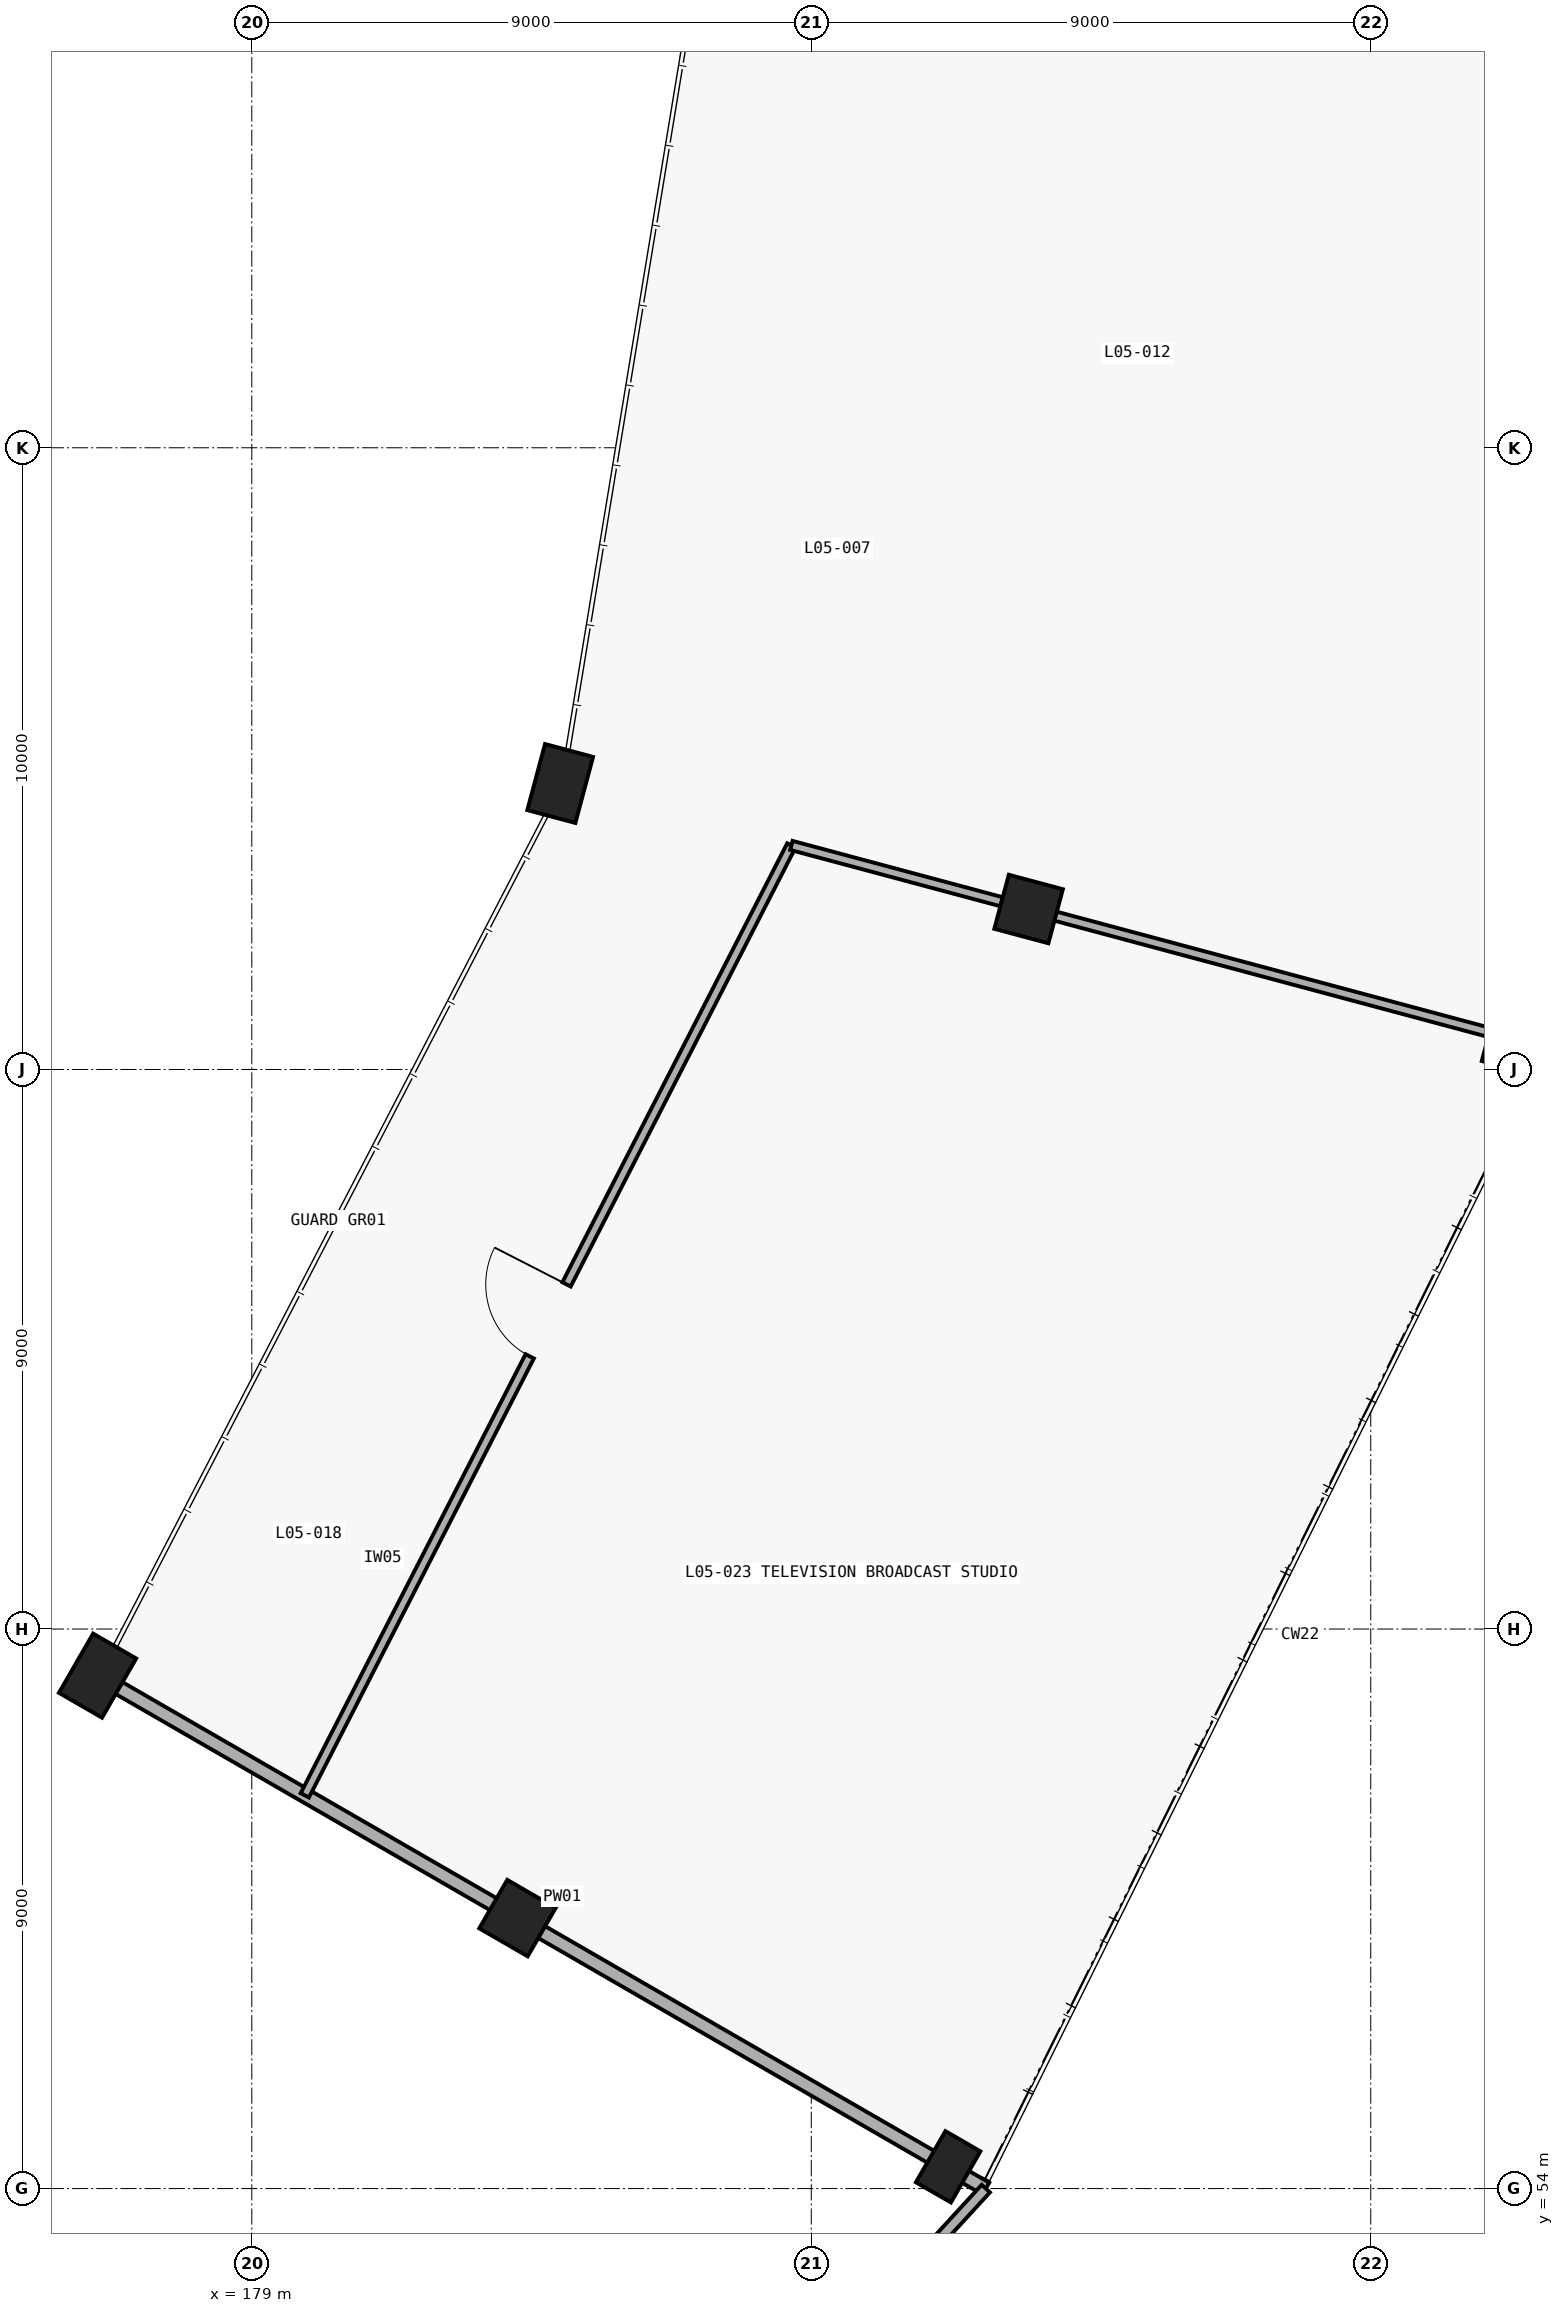
"""IFC4 building model, lengths in metres.
Left out: names, types, materials, properties, quantities, classifications, styles, units other than length and angle.
Written with IfcOpenShell. Run it as: python <this file> out.ifc"""

import sys

from ifc_helpers import new_model, si_unit, direction, frame, frame_2d, origin, origin_2d, place, context, subcontext, project, spatial, rectangle, extrude, element, fill, save


model = new_model("IFC4")
c1 = context("Model", 3, precision=1e-05, world=origin(), true_north=direction((0.0, 1.0)))
c2 = subcontext(c1, "Body", "Model", "MODEL_VIEW")
j1 = project(units=[si_unit("LENGTHUNIT", "METRE"), si_unit("PLANEANGLEUNIT", "RADIAN")], contexts=[c1])
p1 = place(None, origin())
s1 = spatial("IfcSite", under=j1, at=p1, CompositionType="ELEMENT")
p2 = place(p1, origin())
s2 = spatial("IfcBuilding", under=s1, at=p2, CompositionType="ELEMENT")
p3 = place(p2, frame((0.0, 0.0, 24.6)))
s3 = spatial("IfcBuildingStorey", under=s2, at=p3, CompositionType="ELEMENT", Elevation=24.6)
p4 = place(p3, frame((176.519, 62.25, 0.0), z_axis=(0.0, 0.0, 1.0), x_axis=(-0.866025403784, 0.5, 0.0)))
e1 = element("IfcColumn", 1, at=p4, inside=s3, PredefinedType="COLUMN", context=c2, shape_type="SweptSolid", body=[
    extrude(rectangle(XDim=0.8, YDim=1.1, at=origin_2d()), origin(), (0.0, 0.0, 1.0), 4.8),
])
p5 = place(p3, frame((190.202, 54.35, 0.0), z_axis=(0.0, 0.0, 1.0), x_axis=(-0.866025403784, 0.5, 0.0)))
e2 = element("IfcColumn", 2, at=p5, inside=s3, PredefinedType="COLUMN", context=c2, shape_type="SweptSolid", body=[
    extrude(rectangle(XDim=0.65, YDim=0.95, at=origin_2d()), origin(), (0.0, 0.0, 1.0), 4.8),
])
p6 = place(p3, frame((183.274, 58.35, 0.0), z_axis=(0.0, 0.0, 1.0), x_axis=(-0.866025403784, 0.5, 0.0)))
e3 = element("IfcColumn", 3, at=p6, inside=s3, PredefinedType="COLUMN", context=c2, shape_type="SweptSolid", body=[
    extrude(rectangle(XDim=0.9, YDim=0.9, at=origin_2d()), origin(), (0.0, 0.0, 1.0), 4.8),
])
p7 = place(p3, frame((183.961, 76.6, 0.0), z_axis=(0.0, 0.0, 1.0), x_axis=(-0.965925826289, 0.258819045103, 0.0)))
e4 = element("IfcColumn", 4, at=p7, inside=s3, PredefinedType="COLUMN", context=c2, shape_type="SweptSolid", body=[
    extrude(rectangle(XDim=0.8, YDim=1.1, at=origin_2d()), origin(), (0.0, 0.0, 1.0), 4.8),
])
p8 = place(p3, frame((199.223, 72.511, 0.0), z_axis=(0.0, 0.0, 1.0), x_axis=(-0.965925826289, 0.258819045103, 0.0)))
e5 = element("IfcColumn", 5, at=p8, inside=s3, PredefinedType="COLUMN", context=c2, shape_type="SweptSolid", body=[
    extrude(rectangle(XDim=0.65, YDim=0.95, at=origin_2d()), origin(), (0.0, 0.0, 1.0), 4.8),
])
p9 = place(p3, frame((191.496, 74.581, 0.0), z_axis=(0.0, 0.0, 1.0), x_axis=(-0.965925826289, 0.258819045103, 0.0)))
e6 = element("IfcColumn", 6, at=p9, inside=s3, PredefinedType="COLUMN", context=c2, shape_type="SweptSolid", body=[
    extrude(rectangle(XDim=0.9, YDim=0.9, at=origin_2d()), origin(), (0.0, 0.0, 1.0), 4.8),
])
p10 = place(p3, frame((176.519, 62.25, 0.0), z_axis=(0.0, 0.0, 1.0), x_axis=(0.866019999656, -0.500009360108, 0.0)))
e7 = element("IfcWall", 7, at=p10, inside=s3, PredefinedType="PARAPET", context=c2, shape_type="SweptSolid", body=[
    extrude(rectangle(XDim=16.5, YDim=0.22, at=frame_2d((8.25, 0.0))), origin(), (0.0, 0.0, 1.0), 3.89),
])
p11 = place(p3, frame((176.347, 38.26, 0.0), z_axis=(0.0, 0.0, 1.0), x_axis=(0.676559509476, 0.736387961701, 0.0)))
e8 = element("IfcWall", 8, at=p11, inside=s3, PredefinedType="PARAPET", context=c2, shape_type="SweptSolid", body=[
    extrude(rectangle(XDim=21.375, YDim=0.18, at=frame_2d((10.687, 0.0))), origin(), (0.0, 0.0, 1.0), 1.15),
])
p12 = place(p3, frame((179.853, 60.325, 0.0), z_axis=(0.0, 0.0, 1.0), x_axis=(0.455924229974, 0.890018593358, 0.0)))
e9 = element("IfcWall", 9, at=p12, inside=s3, PredefinedType="PARTITIONING", context=c2, shape_type="SweptSolid", body=[
    extrude(rectangle(XDim=17.167, YDim=0.15, at=frame_2d((8.583, 0.0))), origin(), (0.0, 0.0, 1.0), 3.84),
])
p13 = place(p12, frame((7.934, 0.0, 0.0)))
e10 = element("IfcOpeningElement", 10, at=p13, cuts=e9, PredefinedType="OPENING", context=c2, shape_type="SweptSolid", body=[
    extrude(rectangle(XDim=1.3, YDim=2.25, at=frame_2d((0.65, 1.125))), frame((0.0, 0.085, 0.0), z_axis=(0.0, -1.0, 0.0), x_axis=(1.0, 0.0, 0.0)), (0.0, 0.0, 1.0), 0.17),
])
p14 = place(p3, frame((187.68, 75.604, 0.0), z_axis=(0.0, 0.0, 1.0), x_axis=(0.965928834191, -0.258807819197, 0.0)))
e11 = element("IfcWall", 11, at=p14, inside=s3, PredefinedType="PARTITIONING", context=c2, shape_type="SweptSolid", body=[
    extrude(rectangle(XDim=3.516, YDim=0.15, at=frame_2d((1.758, 0.0))), origin(), (0.0, 0.0, 1.0), 3.84),
])
p15 = place(p3, frame((191.062, 74.698, 0.0), z_axis=(0.0, 0.0, 1.0), x_axis=(0.965916586161, -0.258853527267, 0.0)))
e12 = element("IfcWall", 12, at=p15, inside=s3, PredefinedType="PARTITIONING", context=c2, shape_type="SweptSolid", body=[
    extrude(rectangle(XDim=8.139, YDim=0.15, at=frame_2d((4.07, 0.0))), origin(), (0.0, 0.0, 1.0), 3.84),
])
p16 = place(p13, origin())
e13 = element("IfcDoor", 13, at=p16, inside=s3, OperationType="SINGLE_SWING_RIGHT", PredefinedType="DOOR", context=c2, shape_type="SweptSolid", body=[
    extrude(rectangle(XDim=1.3, YDim=2.25, at=frame_2d((0.65, 1.125))), frame((0.0, 0.025, 0.0), z_axis=(0.0, -1.0, 0.0), x_axis=(1.0, 0.0, 0.0)), (0.0, 0.0, 1.0), 0.05),
])
fill(e10, e13)
save(model, sys.argv[1])
